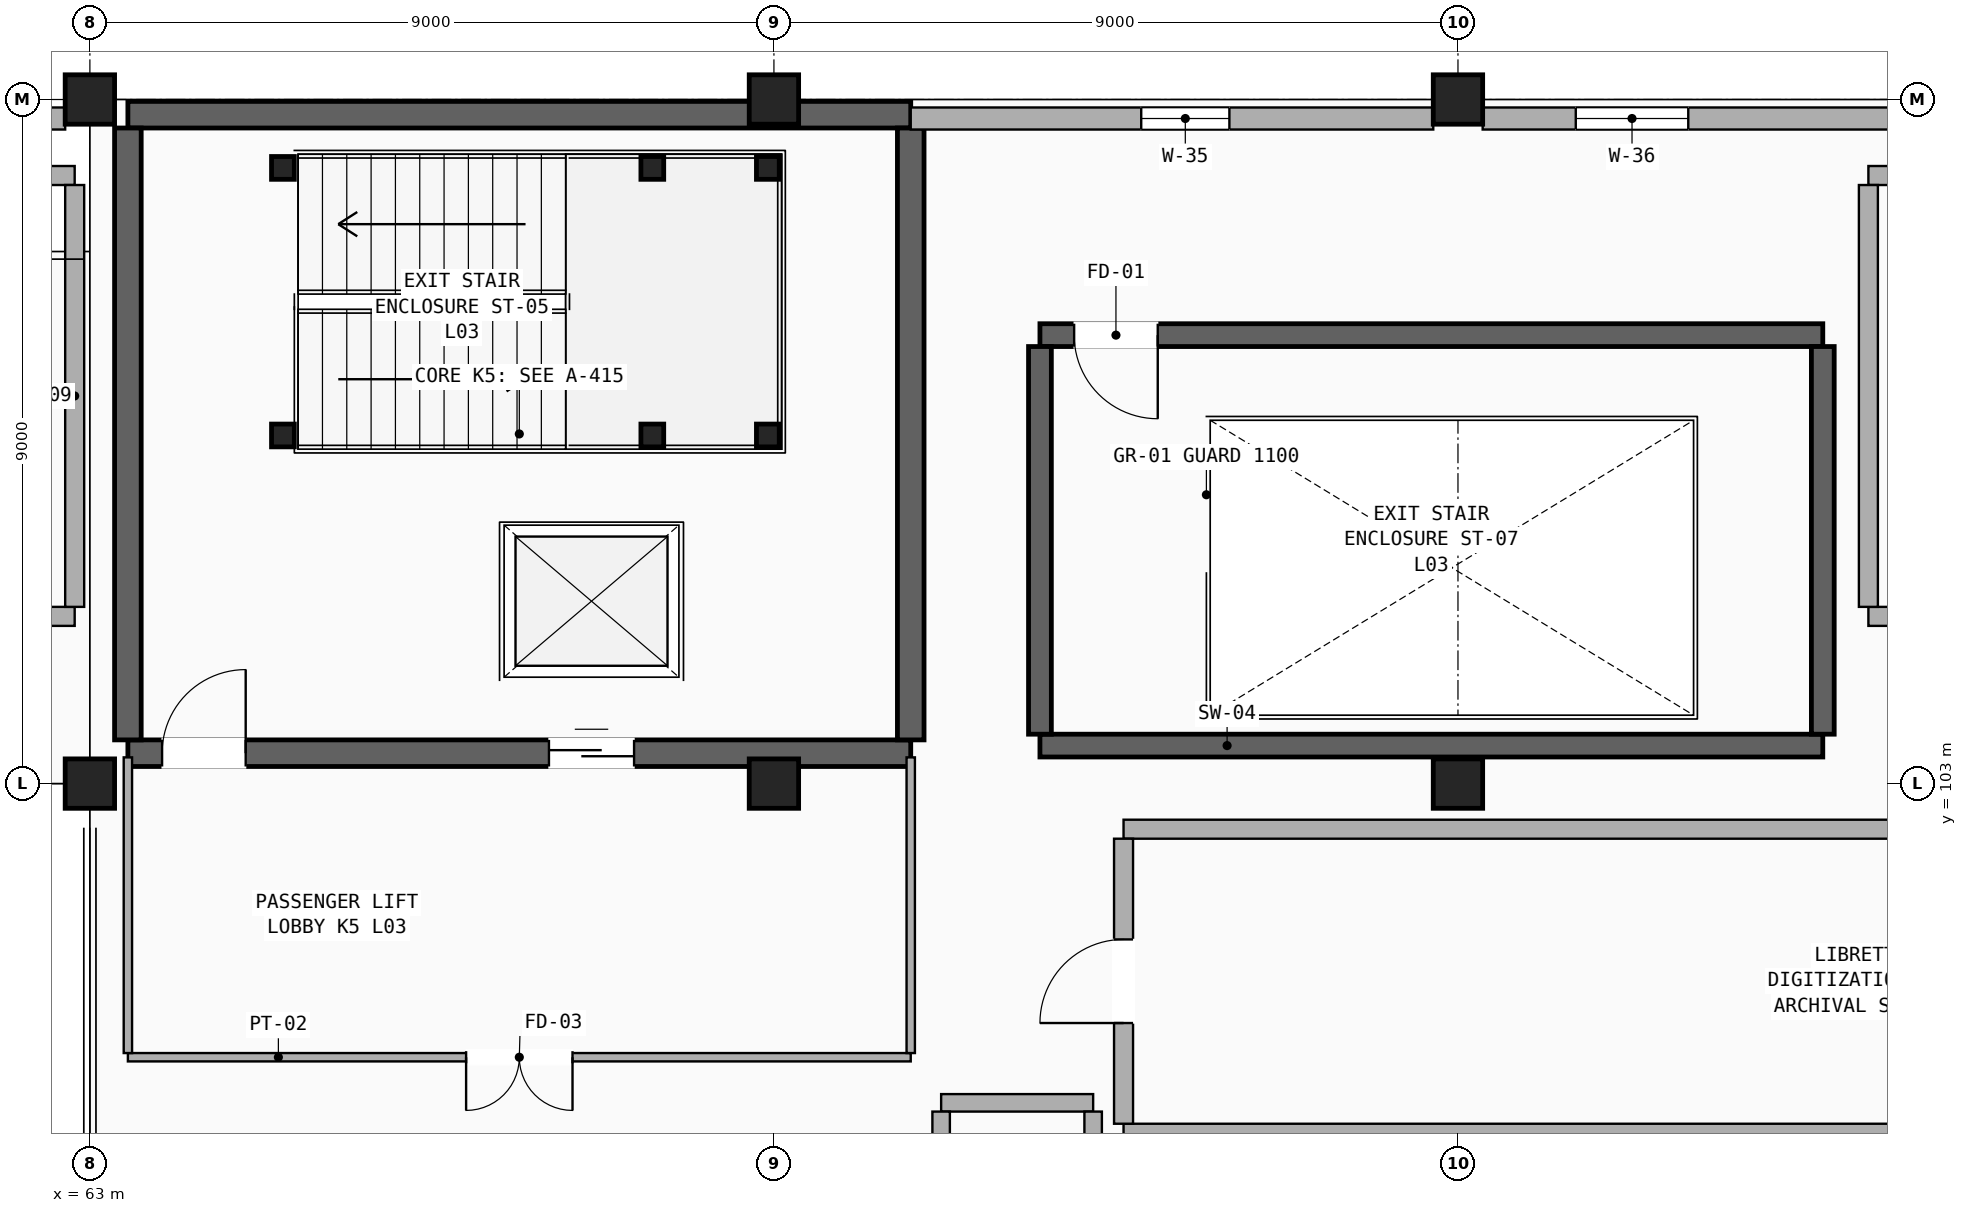
"""IFC4 building model, lengths in metres.
Left out: names, types, materials, properties, quantities, classifications, styles, units other than length and angle.
Written with IfcOpenShell. Run it as: python <this file> out.ifc"""

import sys

from ifc_helpers import new_model, si_unit, direction, frame, frame_2d, origin, origin_2d, place, context, subcontext, project, spatial, rectangle, hollow_rectangle, extrude, element, fill, save


model = new_model("IFC4")
c1 = context("Model", 3, precision=1e-05, world=origin(), true_north=direction((0.0, 1.0)))
c2 = subcontext(c1, "Body", "Model", "MODEL_VIEW")
j1 = project(units=[si_unit("LENGTHUNIT", "METRE"), si_unit("PLANEANGLEUNIT", "RADIAN")], contexts=[c1])
p1 = place(None, origin())
s1 = spatial("IfcSite", under=j1, at=p1, CompositionType="ELEMENT")
p2 = place(p1, origin())
s2 = spatial("IfcBuilding", under=s1, at=p2, CompositionType="ELEMENT")
p3 = place(p2, frame((0.0, 0.0, 13.6)))
s3 = spatial("IfcBuildingStorey", under=s2, at=p3, CompositionType="ELEMENT", Elevation=13.6)
for number, where, z_axis, x_axis in (
    (1, (81.0, 103.0, 0.0), (0.0, 0.0, 1.0), (1.0, 0.0, 0.0)),
    (2, (81.0, 112.0, 0.0), (0.0, 0.0, 1.0), (1.0, 0.0, 0.0)),
    (3, (63.0, 103.0, 0.0), (0.0, 0.0, 1.0), (1.0, 0.0, 0.0)),
    (4, (63.0, 112.0, 0.0), (0.0, 0.0, 1.0), (1.0, 0.0, 0.0)),
    (5, (72.0, 103.0, 0.0), (0.0, 0.0, 1.0), (1.0, 0.0, 0.0)),
    (6, (72.0, 112.0, 0.0), (0.0, 0.0, 1.0), (1.0, 0.0, 0.0)),
):
    element("IfcColumn", number, at=place(p3, frame(where, z_axis=z_axis, x_axis=x_axis)), inside=s3, PredefinedType="COLUMN", context=c2, shape_type="SweptSolid", body=[
        extrude(rectangle(XDim=0.65, YDim=0.65, at=origin_2d()), origin(), (0.0, 0.0, 1.0), 4.08),
    ])
p4 = place(p3, frame((63.5, 103.4, 0.0), z_axis=(0.0, 0.0, 1.0), x_axis=(1.0, 0.0, 0.0)))
e7 = element("IfcWall", 7, at=p4, inside=s3, PredefinedType="SHEAR", context=c2, shape_type="SweptSolid", body=[
    extrude(rectangle(XDim=10.3, YDim=0.35, at=frame_2d((5.15, 0.0))), origin(), (0.0, 0.0, 1.0), 4.08),
])
p5 = place(p4, frame((0.45, 0.0, 0.0)))
e8 = element("IfcOpeningElement", 8, at=p5, cuts=e7, PredefinedType="OPENING", context=c2, shape_type="SweptSolid", body=[
    extrude(rectangle(XDim=1.1, YDim=2.2, at=frame_2d((0.55, 1.1))), frame((0.0, 0.185, 0.0), z_axis=(0.0, -1.0, 0.0), x_axis=(1.0, 0.0, 0.0)), (0.0, 0.0, 1.0), 0.37),
])
p6 = place(p4, frame((5.54, 0.0, 0.0)))
e9 = element("IfcOpeningElement", 9, at=p6, cuts=e7, PredefinedType="OPENING", context=c2, shape_type="SweptSolid", body=[
    extrude(rectangle(XDim=1.12, YDim=2.16, at=frame_2d((0.56, 1.08))), frame((0.0, 0.185, 0.0), z_axis=(0.0, -1.0, 0.0), x_axis=(1.0, 0.0, 0.0)), (0.0, 0.0, 1.0), 0.37),
])
p7 = place(p3, frame((63.5, 111.8, 0.0), z_axis=(0.0, 0.0, 1.0), x_axis=(1.0, 0.0, 0.0)))
e10 = element("IfcWall", 10, at=p7, inside=s3, PredefinedType="SHEAR", context=c2, shape_type="SweptSolid", body=[
    extrude(rectangle(XDim=10.3, YDim=0.35, at=frame_2d((5.15, 0.0))), origin(), (0.0, 0.0, 1.0), 4.08),
])
for number, where, z_axis, x_axis in (
    (11, (63.5, 103.575, 0.0), (0.0, 0.0, 1.0), (0.0, 1.0, 0.0)),
    (12, (73.8, 103.575, 0.0), (0.0, 0.0, 1.0), (0.0, 1.0, 0.0)),
):
    element("IfcWall", number, at=place(p3, frame(where, z_axis=z_axis, x_axis=x_axis)), inside=s3, PredefinedType="SHEAR", context=c2, shape_type="SweptSolid", body=[
        extrude(rectangle(XDim=8.05, YDim=0.35, at=frame_2d((4.025, 0.0))), origin(), (0.0, 0.0, 1.0), 4.08),
    ])
p8 = place(p3, frame((75.5, 103.5, 0.0), z_axis=(0.0, 0.0, 1.0), x_axis=(1.0, 0.0, 0.0)))
e13 = element("IfcWall", 13, at=p8, inside=s3, PredefinedType="SHEAR", context=c2, shape_type="SweptSolid", body=[
    extrude(rectangle(XDim=10.3, YDim=0.3, at=frame_2d((5.15, 0.0))), origin(), (0.0, 0.0, 1.0), 4.08),
])
p9 = place(p3, frame((75.5, 108.9, 0.0), z_axis=(0.0, 0.0, 1.0), x_axis=(1.0, 0.0, 0.0)))
e14 = element("IfcWall", 14, at=p9, inside=s3, PredefinedType="SHEAR", context=c2, shape_type="SweptSolid", body=[
    extrude(rectangle(XDim=10.3, YDim=0.3, at=frame_2d((5.15, 0.0))), origin(), (0.0, 0.0, 1.0), 4.08),
])
p10 = place(p9, frame((0.45, 0.0, 0.0)))
e15 = element("IfcOpeningElement", 15, at=p10, cuts=e14, PredefinedType="OPENING", context=c2, shape_type="SweptSolid", body=[
    extrude(rectangle(XDim=1.1, YDim=2.2, at=frame_2d((0.55, 1.1))), frame((0.0, 0.16, 0.0), z_axis=(0.0, -1.0, 0.0), x_axis=(1.0, 0.0, 0.0)), (0.0, 0.0, 1.0), 0.32),
])
for number, where, z_axis, x_axis in (
    (16, (75.5, 103.65, 0.0), (0.0, 0.0, 1.0), (0.0, 1.0, 0.0)),
    (17, (85.8, 103.65, 0.0), (0.0, 0.0, 1.0), (0.0, 1.0, 0.0)),
):
    element("IfcWall", number, at=place(p3, frame(where, z_axis=z_axis, x_axis=x_axis)), inside=s3, PredefinedType="SHEAR", context=c2, shape_type="SweptSolid", body=[
        extrude(rectangle(XDim=5.1, YDim=0.3, at=frame_2d((2.55, 0.0))), origin(), (0.0, 0.0, 1.0), 4.08),
    ])
p11 = place(p3, frame((54.325, 111.75, 0.0), z_axis=(0.0, 0.0, 1.0), x_axis=(1.0, 0.0, 0.0)))
e18 = element("IfcWall", 18, at=p11, inside=s3, PredefinedType="STANDARD", context=c2, shape_type="SweptSolid", body=[
    extrude(rectangle(XDim=8.35, YDim=0.29, at=frame_2d((4.175, 0.0))), origin(), (0.0, 0.0, 1.0), 3.277),
])
p12 = place(p11, frame((1.225, 0.0, 0.9)))
e19 = element("IfcOpeningElement", 19, at=p12, cuts=e18, PredefinedType="OPENING", context=c2, shape_type="SweptSolid", body=[
    extrude(rectangle(XDim=2.28, YDim=1.72, at=frame_2d((1.14, 0.86))), frame((0.0, 0.155, 0.0), z_axis=(0.0, -1.0, 0.0), x_axis=(1.0, 0.0, 0.0)), (0.0, 0.0, 1.0), 0.31),
])
p13 = place(p11, frame((4.97, 0.0, 0.9)))
e20 = element("IfcOpeningElement", 20, at=p13, cuts=e18, PredefinedType="OPENING", context=c2, shape_type="SweptSolid", body=[
    extrude(rectangle(XDim=2.28, YDim=1.72, at=frame_2d((1.14, 0.86))), frame((0.0, 0.155, 0.0), z_axis=(0.0, -1.0, 0.0), x_axis=(1.0, 0.0, 0.0)), (0.0, 0.0, 1.0), 0.31),
])
p14 = place(p3, frame((73.8, 111.75, 0.0), z_axis=(0.0, 0.0, 1.0), x_axis=(1.0, 0.0, 0.0)))
e21 = element("IfcWall", 21, at=p14, inside=s3, PredefinedType="STANDARD", context=c2, shape_type="SweptSolid", body=[
    extrude(rectangle(XDim=6.875, YDim=0.29, at=frame_2d((3.438, 0.0))), origin(), (0.0, 0.0, 1.0), 3.07),
])
p15 = place(p14, frame((3.032, 0.0, 0.9)))
e22 = element("IfcOpeningElement", 22, at=p15, cuts=e21, PredefinedType="OPENING", context=c2, shape_type="SweptSolid", body=[
    extrude(rectangle(XDim=1.16, YDim=1.9, at=frame_2d((0.58, 0.95))), frame((0.0, 0.155, 0.0), z_axis=(0.0, -1.0, 0.0), x_axis=(1.0, 0.0, 0.0)), (0.0, 0.0, 1.0), 0.31),
])
p16 = place(p3, frame((81.325, 111.75, 0.0), z_axis=(0.0, 0.0, 1.0), x_axis=(1.0, 0.0, 0.0)))
e23 = element("IfcWall", 23, at=p16, inside=s3, PredefinedType="STANDARD", context=c2, shape_type="SweptSolid", body=[
    extrude(rectangle(XDim=8.35, YDim=0.29, at=frame_2d((4.175, 0.0))), origin(), (0.0, 0.0, 1.0), 3.07),
])
p17 = place(p16, frame((1.225, 0.0, 0.9)))
e24 = element("IfcOpeningElement", 24, at=p17, cuts=e23, PredefinedType="OPENING", context=c2, shape_type="SweptSolid", body=[
    extrude(rectangle(XDim=1.48, YDim=1.9, at=frame_2d((0.74, 0.95))), frame((0.0, 0.155, 0.0), z_axis=(0.0, -1.0, 0.0), x_axis=(1.0, 0.0, 0.0)), (0.0, 0.0, 1.0), 0.31),
])
p18 = place(p16, frame((5.77, 0.0, 0.9)))
e25 = element("IfcOpeningElement", 25, at=p18, cuts=e23, PredefinedType="OPENING", context=c2, shape_type="SweptSolid", body=[
    extrude(rectangle(XDim=1.48, YDim=1.9, at=frame_2d((0.74, 0.95))), frame((0.0, 0.155, 0.0), z_axis=(0.0, -1.0, 0.0), x_axis=(1.0, 0.0, 0.0)), (0.0, 0.0, 1.0), 0.31),
])
for number, where, z_axis, x_axis in (
    (26, (65.54, 107.58, 0.0), (0.0, 0.0, 1.0), (1.0, 0.0, 0.0)),
    (27, (65.54, 111.1, 0.0), (0.0, 0.0, 1.0), (1.0, 0.0, 0.0)),
    (28, (70.4, 107.58, 0.0), (0.0, 0.0, 1.0), (1.0, 0.0, 0.0)),
    (29, (70.4, 111.1, 0.0), (0.0, 0.0, 1.0), (1.0, 0.0, 0.0)),
    (30, (71.92, 107.58, 0.0), (0.0, 0.0, 1.0), (1.0, 0.0, 0.0)),
    (31, (71.92, 111.1, 0.0), (0.0, 0.0, 1.0), (1.0, 0.0, 0.0)),
):
    element("IfcColumn", number, at=place(p3, frame(where, z_axis=z_axis, x_axis=x_axis)), inside=s3, PredefinedType="COLUMN", context=c2, shape_type="SweptSolid", body=[
        extrude(hollow_rectangle(XDim=0.3, YDim=0.3, WallThickness=0.016, InnerFilletRadius=0.016, OuterFilletRadius=0.032, at=origin_2d()), origin(), (0.0, 0.0, 1.0), 4.08),
    ])
p19 = place(p3, frame((63.5, 99.4, 0.0), z_axis=(0.0, 0.0, 1.0), x_axis=(1.0, 0.0, 0.0)))
e32 = element("IfcWall", 32, at=p19, inside=s3, PredefinedType="PARTITIONING", context=c2, shape_type="SweptSolid", body=[
    extrude(rectangle(XDim=10.3, YDim=0.11, at=frame_2d((5.15, 0.0))), origin(), (0.0, 0.0, 1.0), 3.14),
])
p20 = place(p19, frame((4.45, 0.0, 0.0)))
e33 = element("IfcOpeningElement", 33, at=p20, cuts=e32, PredefinedType="OPENING", context=c2, shape_type="SweptSolid", body=[
    extrude(rectangle(XDim=1.4, YDim=2.2, at=frame_2d((0.7, 1.1))), frame((0.0, 0.065, 0.0), z_axis=(0.0, -1.0, 0.0), x_axis=(1.0, 0.0, 0.0)), (0.0, 0.0, 1.0), 0.13),
])
p21 = place(p3, frame((63.5, 99.455, 0.0), z_axis=(0.0, 0.0, 1.0), x_axis=(0.0, 1.0, 0.0)))
e34 = element("IfcWall", 34, at=p21, inside=s3, PredefinedType="PARTITIONING", context=c2, shape_type="SweptSolid", body=[
    extrude(rectangle(XDim=3.89, YDim=0.11, at=frame_2d((1.945, 0.0))), origin(), (0.0, 0.0, 1.0), 3.07),
])
p22 = place(p3, frame((73.8, 99.455, 0.0), z_axis=(0.0, 0.0, 1.0), x_axis=(0.0, 1.0, 0.0)))
e35 = element("IfcWall", 35, at=p22, inside=s3, PredefinedType="PARTITIONING", context=c2, shape_type="SweptSolid", body=[
    extrude(rectangle(XDim=3.89, YDim=0.11, at=frame_2d((1.945, 0.0))), origin(), (0.0, 0.0, 1.0), 2.97),
])
p23 = place(p3, frame((45.6, 105.2, 0.0), z_axis=(0.0, 0.0, 1.0), x_axis=(1.0, 0.0, 0.0)))
e36 = element("IfcWall", 36, at=p23, inside=s3, PredefinedType="PARTITIONING", context=c2, shape_type="SweptSolid", body=[
    extrude(rectangle(XDim=17.2, YDim=0.25, at=frame_2d((8.6, 0.0))), origin(), (0.0, 0.0, 1.0), 3.17),
])
p24 = place(p23, frame((8.907, 0.0, 0.0)))
e37 = element("IfcOpeningElement", 37, at=p24, cuts=e36, PredefinedType="OPENING", context=c2, shape_type="SweptSolid", body=[
    extrude(rectangle(XDim=1.6, YDim=2.25, at=frame_2d((0.8, 1.125))), frame((0.0, 0.135, 0.0), z_axis=(0.0, -1.0, 0.0), x_axis=(1.0, 0.0, 0.0)), (0.0, 0.0, 1.0), 0.27),
])
p25 = place(p3, frame((45.6, 111.0, 0.0), z_axis=(0.0, 0.0, 1.0), x_axis=(1.0, 0.0, 0.0)))
e38 = element("IfcWall", 38, at=p25, inside=s3, PredefinedType="PARTITIONING", context=c2, shape_type="SweptSolid", body=[
    extrude(rectangle(XDim=17.2, YDim=0.25, at=frame_2d((8.6, 0.0))), origin(), (0.0, 0.0, 1.0), 3.17),
])
p26 = place(p3, frame((62.8, 105.325, 0.0), z_axis=(0.0, 0.0, 1.0), x_axis=(0.0, 1.0, 0.0)))
e39 = element("IfcWall", 39, at=p26, inside=s3, PredefinedType="PARTITIONING", context=c2, shape_type="SweptSolid", body=[
    extrude(rectangle(XDim=5.55, YDim=0.25, at=frame_2d((2.775, 0.0))), origin(), (0.0, 0.0, 1.0), 3.17),
])
p27 = place(p3, frame((74.2, 98.8, 0.0), z_axis=(0.0, 0.0, 1.0), x_axis=(1.0, 0.0, 0.0)))
e40 = element("IfcWall", 40, at=p27, inside=s3, PredefinedType="PARTITIONING", context=c2, shape_type="SweptSolid", body=[
    extrude(rectangle(XDim=2.0, YDim=0.23, at=frame_2d((1.0, 0.0))), origin(), (0.0, 0.0, 1.0), 3.22),
])
for number, where, z_axis, x_axis in (
    (41, (74.2, 82.115, 0.0), (0.0, 0.0, 1.0), (0.0, 1.0, 0.0)),
    (42, (76.2, 82.115, 0.0), (0.0, 0.0, 1.0), (0.0, 1.0, 0.0)),
):
    element("IfcWall", number, at=place(p3, frame(where, z_axis=z_axis, x_axis=x_axis)), inside=s3, PredefinedType="PARTITIONING", context=c2, shape_type="SweptSolid", body=[
        extrude(rectangle(XDim=16.57, YDim=0.23, at=frame_2d((8.285, 0.0))), origin(), (0.0, 0.0, 1.0), 2.82),
    ])
p28 = place(p3, frame((86.4, 105.2, 0.0), z_axis=(0.0, 0.0, 1.0), x_axis=(1.0, 0.0, 0.0)))
e43 = element("IfcWall", 43, at=p28, inside=s3, PredefinedType="PARTITIONING", context=c2, shape_type="SweptSolid", body=[
    extrude(rectangle(XDim=30.0, YDim=0.25, at=frame_2d((15.0, 0.0))), origin(), (0.0, 0.0, 1.0), 3.12),
])
p29 = place(p28, frame((14.3, 0.0, 0.0)))
e44 = element("IfcOpeningElement", 44, at=p29, cuts=e43, PredefinedType="OPENING", context=c2, shape_type="SweptSolid", body=[
    extrude(rectangle(XDim=1.4, YDim=2.2, at=frame_2d((0.7, 1.1))), frame((0.0, 0.135, 0.0), z_axis=(0.0, -1.0, 0.0), x_axis=(1.0, 0.0, 0.0)), (0.0, 0.0, 1.0), 0.27),
])
p30 = place(p3, frame((86.4, 111.0, 0.0), z_axis=(0.0, 0.0, 1.0), x_axis=(1.0, 0.0, 0.0)))
e45 = element("IfcWall", 45, at=p30, inside=s3, PredefinedType="PARTITIONING", context=c2, shape_type="SweptSolid", body=[
    extrude(rectangle(XDim=30.0, YDim=0.25, at=frame_2d((15.0, 0.0))), origin(), (0.0, 0.0, 1.0), 3.12),
])
p31 = place(p3, frame((86.4, 105.325, 0.0), z_axis=(0.0, 0.0, 1.0), x_axis=(0.0, 1.0, 0.0)))
e46 = element("IfcWall", 46, at=p31, inside=s3, PredefinedType="PARTITIONING", context=c2, shape_type="SweptSolid", body=[
    extrude(rectangle(XDim=5.55, YDim=0.25, at=frame_2d((2.775, 0.0))), origin(), (0.0, 0.0, 1.0), 3.84),
])
for number, where, z_axis, x_axis in (
    (47, (76.6, 98.4, 0.0), (0.0, 0.0, 1.0), (1.0, 0.0, 0.0)),
    (48, (76.6, 102.4, 0.0), (0.0, 0.0, 1.0), (1.0, 0.0, 0.0)),
):
    element("IfcWall", number, at=place(p3, frame(where, z_axis=z_axis, x_axis=x_axis)), inside=s3, PredefinedType="PARTITIONING", context=c2, shape_type="SweptSolid", body=[
        extrude(rectangle(XDim=19.4, YDim=0.25, at=frame_2d((9.7, 0.0))), origin(), (0.0, 0.0, 1.0), 2.97),
    ])
p32 = place(p3, frame((76.6, 98.525, 0.0), z_axis=(0.0, 0.0, 1.0), x_axis=(0.0, 1.0, 0.0)))
e49 = element("IfcWall", 49, at=p32, inside=s3, PredefinedType="PARTITIONING", context=c2, shape_type="SweptSolid", body=[
    extrude(rectangle(XDim=3.75, YDim=0.25, at=frame_2d((1.875, 0.0))), origin(), (0.0, 0.0, 1.0), 3.22),
])
p33 = place(p32, frame((1.325, 0.0, 0.0)))
e50 = element("IfcOpeningElement", 50, at=p33, cuts=e49, PredefinedType="OPENING", context=c2, shape_type="SweptSolid", body=[
    extrude(rectangle(XDim=1.1, YDim=2.2, at=frame_2d((0.55, 1.1))), frame((0.0, 0.135, 0.0), z_axis=(0.0, -1.0, 0.0), x_axis=(1.0, 0.0, 0.0)), (0.0, 0.0, 1.0), 0.27),
])
p34 = place(p15, origin())
e51 = element("IfcWindow", 51, at=p34, inside=s3, PartitioningType="SINGLE_PANEL", PredefinedType="WINDOW", context=c2, shape_type="SweptSolid", body=[
    extrude(rectangle(XDim=1.16, YDim=1.9, at=frame_2d((0.58, 0.95))), frame((0.0, 0.03, 0.0), z_axis=(0.0, -1.0, 0.0), x_axis=(1.0, 0.0, 0.0)), (0.0, 0.0, 1.0), 0.06),
])
fill(e22, e51)
p35 = place(p17, origin())
e52 = element("IfcWindow", 52, at=p35, inside=s3, PartitioningType="DOUBLE_PANEL_VERTICAL", PredefinedType="WINDOW", context=c2, shape_type="SweptSolid", body=[
    extrude(rectangle(XDim=1.48, YDim=1.9, at=frame_2d((0.74, 0.95))), frame((0.0, 0.03, 0.0), z_axis=(0.0, -1.0, 0.0), x_axis=(1.0, 0.0, 0.0)), (0.0, 0.0, 1.0), 0.06),
])
fill(e24, e52)
p36 = place(p5, origin())
e53 = element("IfcDoor", 53, at=p36, inside=s3, OperationType="SINGLE_SWING_RIGHT", PredefinedType="DOOR", context=c2, shape_type="SweptSolid", body=[
    extrude(rectangle(XDim=1.1, YDim=2.2, at=frame_2d((0.55, 1.1))), frame((0.0, 0.025, 0.0), z_axis=(0.0, -1.0, 0.0), x_axis=(1.0, 0.0, 0.0)), (0.0, 0.0, 1.0), 0.05),
])
fill(e8, e53)
p37 = place(p10, frame((1.1, 0.0, 0.0), z_axis=(0.0, 0.0, 1.0), x_axis=(-1.0, 0.0, 0.0)))
e54 = element("IfcDoor", 54, at=p37, inside=s3, OperationType="SINGLE_SWING_LEFT", PredefinedType="DOOR", context=c2, shape_type="SweptSolid", body=[
    extrude(rectangle(XDim=1.1, YDim=2.2, at=frame_2d((0.55, 1.1))), frame((0.0, 0.025, 0.0), z_axis=(0.0, -1.0, 0.0), x_axis=(1.0, 0.0, 0.0)), (0.0, 0.0, 1.0), 0.05),
])
fill(e15, e54)
p38 = place(p6, origin())
e55 = element("IfcDoor", 55, at=p38, inside=s3, OperationType="SLIDING_TO_LEFT", PredefinedType="DOOR", context=c2, shape_type="SweptSolid", body=[
    extrude(rectangle(XDim=1.12, YDim=2.16, at=frame_2d((0.56, 1.08))), frame((0.0, 0.025, 0.0), z_axis=(0.0, -1.0, 0.0), x_axis=(1.0, 0.0, 0.0)), (0.0, 0.0, 1.0), 0.05),
])
fill(e9, e55)
p39 = place(p20, frame((1.4, 0.0, 0.0), z_axis=(0.0, 0.0, 1.0), x_axis=(-1.0, 0.0, 0.0)))
e56 = element("IfcDoor", 56, at=p39, inside=s3, OperationType="DOUBLE_DOOR_SINGLE_SWING", PredefinedType="DOOR", context=c2, shape_type="SweptSolid", body=[
    extrude(rectangle(XDim=1.4, YDim=2.2, at=frame_2d((0.7, 1.1))), frame((0.0, 0.025, 0.0), z_axis=(0.0, -1.0, 0.0), x_axis=(1.0, 0.0, 0.0)), (0.0, 0.0, 1.0), 0.05),
])
fill(e33, e56)
p40 = place(p33, origin())
e57 = element("IfcDoor", 57, at=p40, inside=s3, OperationType="SINGLE_SWING_LEFT", PredefinedType="DOOR", context=c2, shape_type="SweptSolid", body=[
    extrude(rectangle(XDim=1.1, YDim=2.2, at=frame_2d((0.55, 1.1))), frame((0.0, 0.025, 0.0), z_axis=(0.0, -1.0, 0.0), x_axis=(1.0, 0.0, 0.0)), (0.0, 0.0, 1.0), 0.05),
])
fill(e50, e57)
save(model, sys.argv[1])
